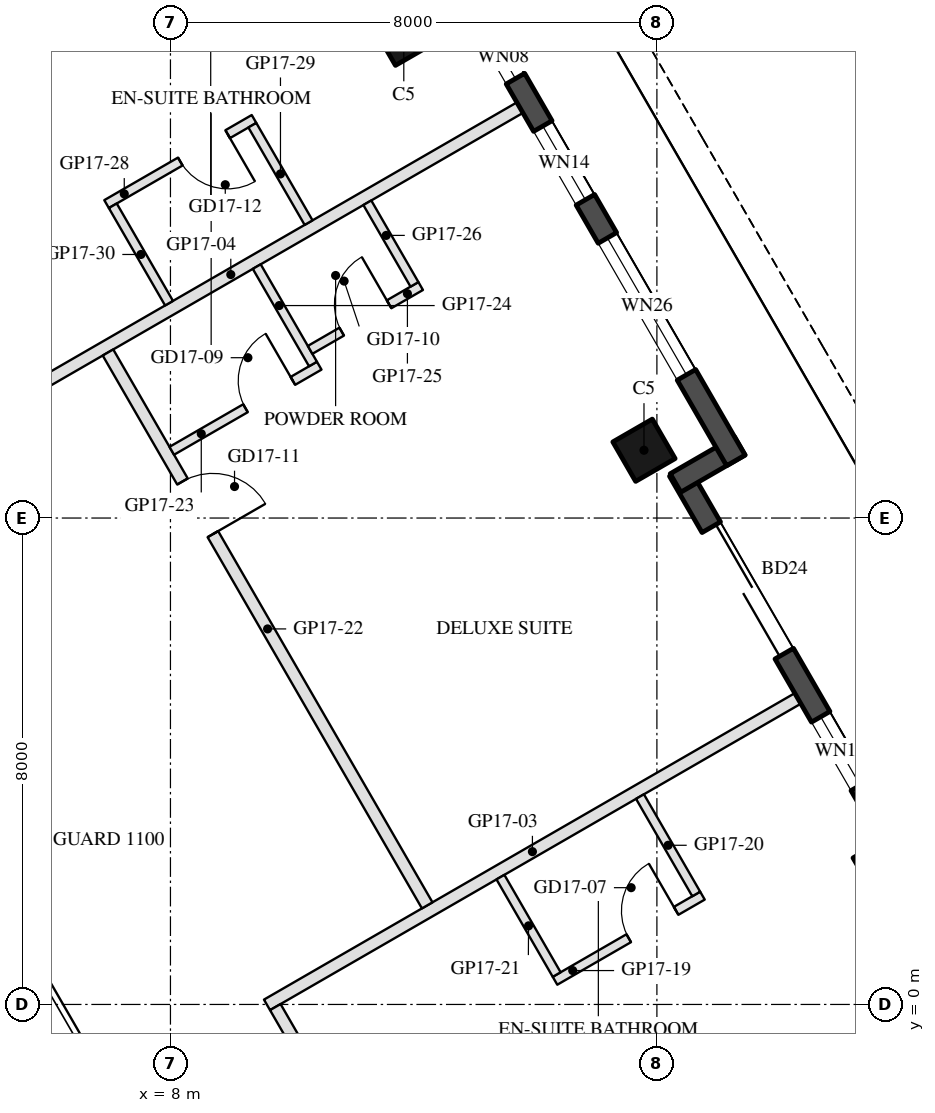
"""IFC4 building model, lengths in metres.
Left out: names, types, materials, properties, quantities, classifications, styles, units other than length and angle.
Written with IfcOpenShell. Run it as: python <this file> out.ifc"""

import sys

from ifc_helpers import new_model, si_unit, direction, frame, frame_2d, origin, origin_2d, place, context, subcontext, project, spatial, rectangle, hollow_rectangle, extrude, element, fill, save


model = new_model("IFC4")
c1 = context("Model", 3, precision=1e-05, world=origin(), true_north=direction((0.0, 1.0)))
c2 = subcontext(c1, "Body", "Model", "MODEL_VIEW")
j1 = project(units=[si_unit("LENGTHUNIT", "METRE"), si_unit("PLANEANGLEUNIT", "RADIAN")], contexts=[c1])
p1 = place(None, origin())
s1 = spatial("IfcSite", under=j1, at=p1, CompositionType="ELEMENT")
p2 = place(p1, origin())
s2 = spatial("IfcBuilding", under=s1, at=p2, CompositionType="ELEMENT")
p3 = place(p2, frame((0.0, 0.0, 187.3)))
s3 = spatial("IfcBuildingStorey", under=s2, at=p3, CompositionType="ELEMENT", Elevation=187.3)
for number, where, z_axis, x_axis in (
    (1, (19.738, 2.273, 0.0), (0.0, 0.0, 1.0), (-0.5, 0.866, 0.0)),
    (2, (15.788, 9.115, 0.0), (0.0, 0.0, 1.0), (-0.5, 0.866, 0.0)),
    (3, (11.838, 15.957, 0.0), (0.0, 0.0, 1.0), (-0.5, 0.866, 0.0)),
):
    element("IfcColumn", number, at=place(p3, frame(where, z_axis=z_axis, x_axis=x_axis)), inside=s3, PredefinedType="COLUMN", context=c2, shape_type="SweptSolid", body=[
        extrude(hollow_rectangle(XDim=0.75, YDim=0.75, WallThickness=0.035, at=origin_2d()), origin(), (0.0, 0.0, 1.0), 3.7),
    ])
p4 = place(p3, frame((19.729, 2.938, 0.0), z_axis=(0.0, 0.0, 1.0), x_axis=(-0.499976430342, 0.866039011305, 0.0)))
e4 = element("IfcWall", 4, at=p4, inside=s3, PredefinedType="SOLIDWALL", context=c2, shape_type="SweptSolid", body=[
    extrude(rectangle(XDim=6.74, YDim=0.35, at=frame_2d((3.37, 0.0))), origin(), (0.0, 0.0, 1.0), 3.55),
])
p5 = place(p4, frame((0.77, 0.0, 0.3)))
e5 = element("IfcOpeningElement", 5, at=p5, cuts=e4, PredefinedType="OPENING", context=c2, shape_type="SweptSolid", body=[
    extrude(rectangle(XDim=1.3, YDim=2.65, at=frame_2d((0.65, 1.325))), frame((0.0, 0.185, 0.0), z_axis=(0.0, -1.0, 0.0), x_axis=(1.0, 0.0, 0.0)), (0.0, 0.0, 1.0), 0.37),
])
p6 = place(p4, frame((3.27, 0.0, 0.0)))
e6 = element("IfcOpeningElement", 6, at=p6, cuts=e4, PredefinedType="OPENING", context=c2, shape_type="SweptSolid", body=[
    extrude(rectangle(XDim=2.4, YDim=2.4, at=frame_2d((1.2, 1.2))), frame((0.0, 0.185, 0.0), z_axis=(0.0, -1.0, 0.0), x_axis=(1.0, 0.0, 0.0)), (0.0, 0.0, 1.0), 0.37),
])
p7 = place(p3, frame((16.306, 8.577, 0.0), z_axis=(0.0, 0.0, 1.0), x_axis=(0.866092288191, 0.499884134912, 0.0)))
e7 = element("IfcWall", 7, at=p7, inside=s3, PredefinedType="SOLIDWALL", context=c2, shape_type="SweptSolid", body=[
    extrude(rectangle(XDim=1.22, YDim=0.35, at=frame_2d((0.61, 0.0))), origin(), (0.0, 0.0, 1.0), 3.55),
])
p8 = place(p3, frame((17.299, 8.948, 0.0), z_axis=(0.0, 0.0, 1.0), x_axis=(-0.500010041276, 0.866019606374, 0.0)))
e8 = element("IfcWall", 8, at=p8, inside=s3, PredefinedType="SOLIDWALL", context=c2, shape_type="SweptSolid", body=[
    extrude(rectangle(XDim=9.7, YDim=0.35, at=frame_2d((4.85, 0.0))), origin(), (0.0, 0.0, 1.0), 3.55),
])
p9 = place(p8, frame((1.625, 0.0, 0.3)))
e9 = element("IfcOpeningElement", 9, at=p9, cuts=e8, PredefinedType="OPENING", context=c2, shape_type="SweptSolid", body=[
    extrude(rectangle(XDim=2.6, YDim=2.65, at=frame_2d((1.3, 1.325))), frame((0.0, 0.185, 0.0), z_axis=(0.0, -1.0, 0.0), x_axis=(1.0, 0.0, 0.0)), (0.0, 0.0, 1.0), 0.37),
])
p10 = place(p8, frame((4.949, 0.0, 0.3)))
e10 = element("IfcOpeningElement", 10, at=p10, cuts=e8, PredefinedType="OPENING", context=c2, shape_type="SweptSolid", body=[
    extrude(rectangle(XDim=1.4, YDim=2.65, at=frame_2d((0.7, 1.325))), frame((0.0, 0.185, 0.0), z_axis=(0.0, -1.0, 0.0), x_axis=(1.0, 0.0, 0.0)), (0.0, 0.0, 1.0), 0.37),
])
p11 = place(p8, frame((7.25, 0.0, 0.3)))
e11 = element("IfcOpeningElement", 11, at=p11, cuts=e8, PredefinedType="OPENING", context=c2, shape_type="SweptSolid", body=[
    extrude(rectangle(XDim=0.8, YDim=2.65, at=frame_2d((0.4, 1.325))), frame((0.0, 0.185, 0.0), z_axis=(0.0, -1.0, 0.0), x_axis=(1.0, 0.0, 0.0)), (0.0, 0.0, 1.0), 0.37),
])
p12 = place(p3, frame((18.318, 5.033, 0.0), z_axis=(0.0, 0.0, 1.0), x_axis=(-0.866028692387, -0.49999430393, 0.0)))
e12 = element("IfcWall", 12, at=p12, inside=s3, PredefinedType="PARTITIONING", context=c2, shape_type="SweptSolid", body=[
    extrude(rectangle(XDim=10.08, YDim=0.2, at=frame_2d((5.04, 0.0))), origin(), (0.0, 0.0, 1.0), 3.06),
])
p13 = place(p3, frame((13.747, 14.75, 0.0), z_axis=(0.0, 0.0, 1.0), x_axis=(-0.866027479907, -0.499996404033, 0.0)))
e13 = element("IfcWall", 13, at=p13, inside=s3, PredefinedType="PARTITIONING", context=c2, shape_type="SweptSolid", body=[
    extrude(rectangle(XDim=10.98, YDim=0.2, at=frame_2d((5.49, 0.0))), origin(), (0.0, 0.0, 1.0), 3.06),
])
p14 = place(p3, frame((9.725, -0.043, 0.0), z_axis=(0.0, 0.0, 1.0), x_axis=(0.500014573982, -0.866016989329, 0.0)))
e14 = element("IfcWall", 14, at=p14, inside=s3, PredefinedType="PARTITIONING", context=c2, shape_type="SweptSolid", body=[
    extrude(rectangle(XDim=5.088, YDim=0.2, at=frame_2d((2.544, 0.0))), origin(), (0.0, 0.0, 1.0), 2.95),
])
p15 = place(p14, frame((2.044, 0.0, 0.0)))
e15 = element("IfcOpeningElement", 15, at=p15, cuts=e14, PredefinedType="OPENING", context=c2, shape_type="SweptSolid", body=[
    extrude(rectangle(XDim=1.0, YDim=2.1, at=frame_2d((0.5, 1.05))), frame((0.0, 0.11, 0.0), z_axis=(0.0, -1.0, 0.0), x_axis=(1.0, 0.0, 0.0)), (0.0, 0.0, 1.0), 0.22),
])
p16 = place(p3, frame((14.324, 0.389, 0.0), z_axis=(0.0, 0.0, 1.0), x_axis=(0.866034573852, 0.49998411664, 0.0)))
e16 = element("IfcWall", 16, at=p16, inside=s3, PredefinedType="PARTITIONING", context=c2, shape_type="SweptSolid", body=[
    extrude(rectangle(XDim=2.8, YDim=0.15, at=frame_2d((1.4, 0.0))), origin(), (0.0, 0.0, 1.0), 3.55),
])
p17 = place(p16, frame((1.4, 0.0, 0.0)))
e17 = element("IfcOpeningElement", 17, at=p17, cuts=e16, PredefinedType="OPENING", context=c2, shape_type="SweptSolid", body=[
    extrude(rectangle(XDim=0.9, YDim=2.1, at=frame_2d((0.45, 1.05))), frame((0.0, 0.085, 0.0), z_axis=(0.0, -1.0, 0.0), x_axis=(1.0, 0.0, 0.0)), (0.0, 0.0, 1.0), 0.17),
])
p18 = place(p3, frame((16.647, 1.817, 0.0), z_axis=(0.0, 0.0, 1.0), x_axis=(-0.500042316284, 0.866000971088, 0.0)))
e18 = element("IfcWall", 18, at=p18, inside=s3, PredefinedType="PARTITIONING", context=c2, shape_type="SweptSolid", body=[
    extrude(rectangle(XDim=1.85, YDim=0.15, at=frame_2d((0.925, 0.0))), origin(), (0.0, 0.0, 1.0), 3.55),
])
p19 = place(p3, frame((14.352, 0.492, 0.0), z_axis=(0.0, 0.0, 1.0), x_axis=(-0.499886193382, 0.866091100096, 0.0)))
e19 = element("IfcWall", 19, at=p19, inside=s3, PredefinedType="PARTITIONING", context=c2, shape_type="SweptSolid", body=[
    extrude(rectangle(XDim=1.85, YDim=0.15, at=frame_2d((0.925, 0.0))), origin(), (0.0, 0.0, 1.0), 3.55),
])
p20 = place(p3, frame((6.973, 10.723, 0.0), z_axis=(0.0, 0.0, 1.0), x_axis=(0.500000207062, -0.866025284237, 0.0)))
e20 = element("IfcWall", 20, at=p20, inside=s3, PredefinedType="PARTITIONING", context=c2, shape_type="SweptSolid", body=[
    extrude(rectangle(XDim=10.5, YDim=0.2, at=frame_2d((5.25, 0.0))), origin(), (0.0, 0.0, 1.0), 2.95),
])
p21 = place(p20, frame((2.45, 0.0, 0.0)))
e21 = element("IfcOpeningElement", 21, at=p21, cuts=e20, PredefinedType="OPENING", context=c2, shape_type="SweptSolid", body=[
    extrude(rectangle(XDim=1.0, YDim=2.1, at=frame_2d((0.5, 1.05))), frame((0.0, 0.11, 0.0), z_axis=(0.0, -1.0, 0.0), x_axis=(1.0, 0.0, 0.0)), (0.0, 0.0, 1.0), 0.22),
])
p22 = place(p3, frame((8.022, 9.106, 0.0), z_axis=(0.0, 0.0, 1.0), x_axis=(0.866018616679, 0.500011755427, 0.0)))
e22 = element("IfcWall", 22, at=p22, inside=s3, PredefinedType="PARTITIONING", context=c2, shape_type="SweptSolid", body=[
    extrude(rectangle(XDim=2.8, YDim=0.15, at=frame_2d((1.4, 0.0))), origin(), (0.0, 0.0, 1.0), 2.95),
])
p23 = place(p22, frame((1.4, 0.0, 0.0)))
e23 = element("IfcOpeningElement", 23, at=p23, cuts=e22, PredefinedType="OPENING", context=c2, shape_type="SweptSolid", body=[
    extrude(rectangle(XDim=0.9, YDim=2.1, at=frame_2d((0.45, 1.05))), frame((0.0, 0.085, 0.0), z_axis=(0.0, -1.0, 0.0), x_axis=(1.0, 0.0, 0.0)), (0.0, 0.0, 1.0), 0.17),
])
p24 = place(p3, frame((10.344, 10.533, 0.0), z_axis=(0.0, 0.0, 1.0), x_axis=(-0.499985172903, 0.866033964044, 0.0)))
e24 = element("IfcWall", 24, at=p24, inside=s3, PredefinedType="PARTITIONING", context=c2, shape_type="SweptSolid", body=[
    extrude(rectangle(XDim=1.85, YDim=0.15, at=frame_2d((0.925, 0.0))), origin(), (0.0, 0.0, 1.0), 2.95),
])
p25 = place(p3, frame((10.297, 10.766, 0.0), z_axis=(0.0, 0.0, 1.0), x_axis=(0.866009402589, 0.500027713859, 0.0)))
e25 = element("IfcWall", 25, at=p25, inside=s3, PredefinedType="PARTITIONING", context=c2, shape_type="SweptSolid", body=[
    extrude(rectangle(XDim=2.1, YDim=0.15, at=frame_2d((1.05, 0.0))), origin(), (0.0, 0.0, 1.0), 3.55),
])
p26 = place(p25, frame((0.6, 0.0, 0.0)))
e26 = element("IfcOpeningElement", 26, at=p26, cuts=e25, PredefinedType="OPENING", context=c2, shape_type="SweptSolid", body=[
    extrude(rectangle(XDim=0.9, YDim=2.1, at=frame_2d((0.45, 1.05))), frame((0.0, 0.085, 0.0), z_axis=(0.0, -1.0, 0.0), x_axis=(1.0, 0.0, 0.0)), (0.0, 0.0, 1.0), 0.17),
])
p27 = place(p3, frame((12.013, 11.843, 0.0), z_axis=(0.0, 0.0, 1.0), x_axis=(-0.500086022567, 0.865975732936, 0.0)))
e27 = element("IfcWall", 27, at=p27, inside=s3, PredefinedType="PARTITIONING", context=c2, shape_type="SweptSolid", body=[
    extrude(rectangle(XDim=1.55, YDim=0.15, at=frame_2d((0.775, 0.0))), origin(), (0.0, 0.0, 1.0), 3.55),
])
p28 = place(p3, frame((9.374, 14.563, 0.0), z_axis=(0.0, 0.0, 1.0), x_axis=(-0.866034573852, -0.49998411664, 0.0)))
e28 = element("IfcWall", 28, at=p28, inside=s3, PredefinedType="PARTITIONING", context=c2, shape_type="SweptSolid", body=[
    extrude(rectangle(XDim=2.8, YDim=0.15, at=frame_2d((1.4, 0.0))), origin(), (0.0, 0.0, 1.0), 2.95),
])
p29 = place(p28, frame((0.5, 0.0, 0.0)))
e29 = element("IfcOpeningElement", 29, at=p29, cuts=e28, PredefinedType="OPENING", context=c2, shape_type="SweptSolid", body=[
    extrude(rectangle(XDim=0.9, YDim=2.1, at=frame_2d((0.45, 1.05))), frame((0.0, 0.085, 0.0), z_axis=(0.0, -1.0, 0.0), x_axis=(1.0, 0.0, 0.0)), (0.0, 0.0, 1.0), 0.17),
])
for number, where, z_axis, x_axis in (
    (30, (10.272, 12.859, 0.0), (0.0, 0.0, 1.0), (-0.5, 0.866, 0.0)),
    (31, (7.977, 11.534, 0.0), (0.0, 0.0, 1.0), (-0.5, 0.866, 0.0)),
):
    element("IfcWall", number, at=place(p3, frame(where, z_axis=z_axis, x_axis=x_axis)), inside=s3, PredefinedType="PARTITIONING", context=c2, shape_type="SweptSolid", body=[
        extrude(rectangle(XDim=1.85, YDim=0.15, at=frame_2d((0.925, 0.0))), origin(), (0.0, 0.0, 1.0), 2.95),
    ])
p30 = place(p5, origin())
e32 = element("IfcWindow", 32, at=p30, inside=s3, PartitioningType="SINGLE_PANEL", PredefinedType="WINDOW", context=c2, shape_type="SweptSolid", body=[
    extrude(rectangle(XDim=1.3, YDim=2.65, at=frame_2d((0.65, 1.325))), frame((0.0, 0.03, 0.0), z_axis=(0.0, -1.0, 0.0), x_axis=(1.0, 0.0, 0.0)), (0.0, 0.0, 1.0), 0.06),
])
fill(e5, e32)
p31 = place(p6, frame((2.4, 0.0, 0.0), z_axis=(0.0, 0.0, 1.0), x_axis=(-1.0, 0.0, 0.0)))
e33 = element("IfcDoor", 33, at=p31, inside=s3, OperationType="SLIDING_TO_LEFT", PredefinedType="DOOR", context=c2, shape_type="SweptSolid", body=[
    extrude(rectangle(XDim=2.4, YDim=2.4, at=frame_2d((1.2, 1.2))), frame((0.0, 0.025, 0.0), z_axis=(0.0, -1.0, 0.0), x_axis=(1.0, 0.0, 0.0)), (0.0, 0.0, 1.0), 0.05),
])
fill(e6, e33)
p32 = place(p9, origin())
e34 = element("IfcWindow", 34, at=p32, inside=s3, PartitioningType="SINGLE_PANEL", PredefinedType="WINDOW", context=c2, shape_type="SweptSolid", body=[
    extrude(rectangle(XDim=2.6, YDim=2.65, at=frame_2d((1.3, 1.325))), frame((0.0, 0.03, 0.0), z_axis=(0.0, -1.0, 0.0), x_axis=(1.0, 0.0, 0.0)), (0.0, 0.0, 1.0), 0.06),
])
fill(e9, e34)
p33 = place(p10, origin())
e35 = element("IfcWindow", 35, at=p33, inside=s3, PartitioningType="SINGLE_PANEL", PredefinedType="WINDOW", context=c2, shape_type="SweptSolid", body=[
    extrude(rectangle(XDim=1.4, YDim=2.65, at=frame_2d((0.7, 1.325))), frame((0.0, 0.03, 0.0), z_axis=(0.0, -1.0, 0.0), x_axis=(1.0, 0.0, 0.0)), (0.0, 0.0, 1.0), 0.06),
])
fill(e10, e35)
p34 = place(p11, origin())
e36 = element("IfcWindow", 36, at=p34, inside=s3, PartitioningType="SINGLE_PANEL", PredefinedType="WINDOW", context=c2, shape_type="SweptSolid", body=[
    extrude(rectangle(XDim=0.8, YDim=2.65, at=frame_2d((0.4, 1.325))), frame((0.0, 0.03, 0.0), z_axis=(0.0, -1.0, 0.0), x_axis=(1.0, 0.0, 0.0)), (0.0, 0.0, 1.0), 0.06),
])
fill(e11, e36)
p35 = place(p17, origin())
e37 = element("IfcDoor", 37, at=p35, inside=s3, OperationType="SINGLE_SWING_RIGHT", PredefinedType="DOOR", context=c2, shape_type="SweptSolid", body=[
    extrude(rectangle(XDim=0.9, YDim=2.1, at=frame_2d((0.45, 1.05))), frame((0.0, 0.025, 0.0), z_axis=(0.0, -1.0, 0.0), x_axis=(1.0, 0.0, 0.0)), (0.0, 0.0, 1.0), 0.05),
])
fill(e17, e37)
p36 = place(p23, origin())
e38 = element("IfcDoor", 38, at=p36, inside=s3, OperationType="SINGLE_SWING_RIGHT", PredefinedType="DOOR", context=c2, shape_type="SweptSolid", body=[
    extrude(rectangle(XDim=0.9, YDim=2.1, at=frame_2d((0.45, 1.05))), frame((0.0, 0.025, 0.0), z_axis=(0.0, -1.0, 0.0), x_axis=(1.0, 0.0, 0.0)), (0.0, 0.0, 1.0), 0.05),
])
fill(e23, e38)
p37 = place(p26, origin())
e39 = element("IfcDoor", 39, at=p37, inside=s3, OperationType="SINGLE_SWING_RIGHT", PredefinedType="DOOR", context=c2, shape_type="SweptSolid", body=[
    extrude(rectangle(XDim=0.9, YDim=2.1, at=frame_2d((0.45, 1.05))), frame((0.0, 0.025, 0.0), z_axis=(0.0, -1.0, 0.0), x_axis=(1.0, 0.0, 0.0)), (0.0, 0.0, 1.0), 0.05),
])
fill(e26, e39)
p38 = place(p21, origin())
e40 = element("IfcDoor", 40, at=p38, inside=s3, OperationType="SINGLE_SWING_RIGHT", PredefinedType="DOOR", context=c2, shape_type="SweptSolid", body=[
    extrude(rectangle(XDim=1.0, YDim=2.1, at=frame_2d((0.5, 1.05))), frame((0.0, 0.025, 0.0), z_axis=(0.0, -1.0, 0.0), x_axis=(1.0, 0.0, 0.0)), (0.0, 0.0, 1.0), 0.05),
])
fill(e21, e40)
p39 = place(p29, origin())
e41 = element("IfcDoor", 41, at=p39, inside=s3, OperationType="SINGLE_SWING_LEFT", PredefinedType="DOOR", context=c2, shape_type="SweptSolid", body=[
    extrude(rectangle(XDim=0.9, YDim=2.1, at=frame_2d((0.45, 1.05))), frame((0.0, 0.025, 0.0), z_axis=(0.0, -1.0, 0.0), x_axis=(1.0, 0.0, 0.0)), (0.0, 0.0, 1.0), 0.05),
])
fill(e29, e41)
save(model, sys.argv[1])
